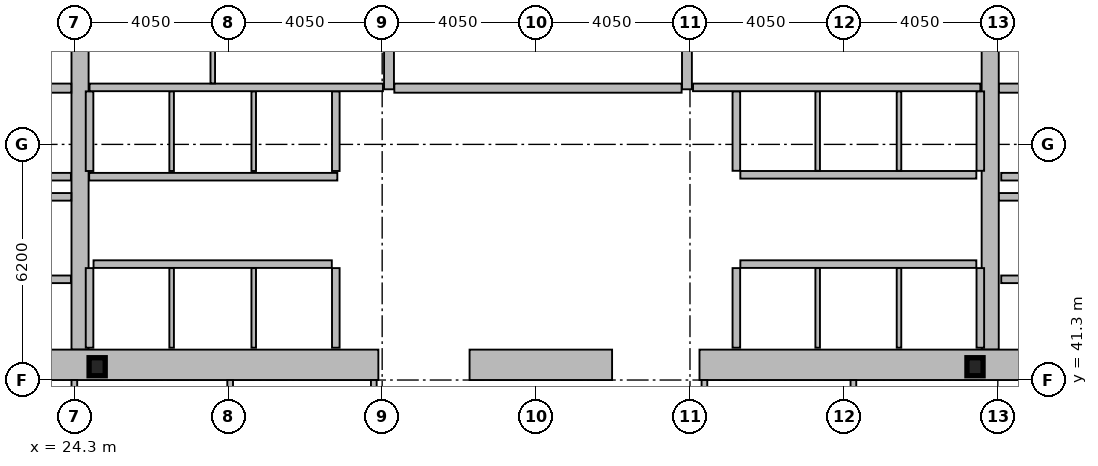
"""IFC4 building model, lengths in metres.
Left out: names, types, materials, properties, quantities, classifications, styles, units other than length and angle.
Written with IfcOpenShell. Run it as: python <this file> out.ifc"""

import sys

from ifc_helpers import new_model, si_unit, direction, frame, frame_2d, origin, origin_2d, place, context, subcontext, project, spatial, rectangle, i_section, extrude, element, fill, save


model = new_model("IFC4")
c1 = context("Model", 3, precision=1e-05, world=origin(), true_north=direction((0.0, 1.0)))
c2 = subcontext(c1, "Body", "Model", "MODEL_VIEW")
j1 = project(units=[si_unit("LENGTHUNIT", "METRE"), si_unit("PLANEANGLEUNIT", "RADIAN")], contexts=[c1])
p1 = place(None, origin())
s1 = spatial("IfcSite", under=j1, at=p1, CompositionType="ELEMENT")
p2 = place(p1, origin())
s2 = spatial("IfcBuilding", under=s1, at=p2, CompositionType="ELEMENT")
p3 = place(p2, frame((0.0, 0.0, 25.8)))
s3 = spatial("IfcBuildingStorey", under=s2, at=p3, CompositionType="ELEMENT", Elevation=25.8)
for number, where, z_axis, x_axis in (
    (1, (24.45, 42.1, 0.0), (0.0, 0.0, 1.0), (0.0, 1.0, 0.0)),
    (2, (48.4, 42.1, 0.0), (0.0, 0.0, 1.0), (0.0, 1.0, 0.0)),
):
    element("IfcWall", number, at=place(p3, frame(where, z_axis=z_axis, x_axis=x_axis)), inside=s3, PredefinedType="SHEAR", context=c2, shape_type="SweptSolid", body=[
        extrude(rectangle(XDim=10.8, YDim=0.45, at=frame_2d((5.4, 0.0))), origin(), (0.0, 0.0, 1.0), 3.82),
    ])
p4 = place(p3, frame((32.3, 41.7, 0.0), z_axis=(0.0, 0.0, 1.0), x_axis=(-1.0, 0.0, 0.0)))
e3 = element("IfcWall", 3, at=p4, inside=s3, PredefinedType="SHEAR", context=c2, shape_type="SweptSolid", body=[
    extrude(rectangle(XDim=11.45, YDim=0.8, at=frame_2d((5.725, 0.0))), origin(), (0.0, 0.0, 1.0), 3.82),
])
p5 = place(p3, frame((38.45, 41.7, 0.0), z_axis=(0.0, 0.0, 1.0), x_axis=(-1.0, 0.0, 0.0)))
e4 = element("IfcWall", 4, at=p5, inside=s3, PredefinedType="SHEAR", context=c2, shape_type="SweptSolid", body=[
    extrude(rectangle(XDim=3.75, YDim=0.8, at=frame_2d((1.875, 0.0))), origin(), (0.0, 0.0, 1.0), 3.82),
])
p6 = place(p3, frame((52.05, 41.7, 0.0), z_axis=(0.0, 0.0, 1.0), x_axis=(-1.0, 0.0, 0.0)))
e5 = element("IfcWall", 5, at=p6, inside=s3, PredefinedType="SHEAR", context=c2, shape_type="SweptSolid", body=[
    extrude(rectangle(XDim=11.3, YDim=0.8, at=frame_2d((5.65, 0.0))), origin(), (0.0, 0.0, 1.0), 3.82),
])
for number, where, z_axis, x_axis in (
    (6, (32.58, 48.95, 0.0), (0.0, 0.0, 1.0), (0.0, 1.0, 0.0)),
    (7, (40.42, 48.95, 0.0), (0.0, 0.0, 1.0), (0.0, 1.0, 0.0)),
):
    element("IfcWall", number, at=place(p3, frame(where, z_axis=z_axis, x_axis=x_axis)), inside=s3, PredefinedType="SHEAR", context=c2, shape_type="SweptSolid", body=[
        extrude(rectangle(XDim=3.95, YDim=0.26, at=frame_2d((1.975, 0.0))), origin(), (0.0, 0.0, 1.0), 3.82),
    ])
p7 = place(p3, frame((17.0, 48.98, 0.0), z_axis=(0.0, 0.0, 1.0), x_axis=(1.0, 0.0, 0.0)))
e8 = element("IfcWall", 8, at=p7, inside=s3, PredefinedType="SHEAR", context=c2, shape_type="SweptSolid", body=[
    extrude(rectangle(XDim=7.22, YDim=0.24, at=frame_2d((3.61, 0.0))), origin(), (0.0, 0.0, 1.0), 3.82),
])
p8 = place(p7, frame((0.22, 0.0, 0.0)))
e9 = element("IfcOpeningElement", 9, at=p8, cuts=e8, PredefinedType="OPENING", context=c2, shape_type="SweptSolid", body=[
    extrude(rectangle(XDim=1.05, YDim=2.15, at=frame_2d((0.525, 1.075))), frame((0.0, 0.13, 0.0), z_axis=(0.0, -1.0, 0.0), x_axis=(1.0, 0.0, 0.0)), (0.0, 0.0, 1.0), 0.26),
])
p9 = place(p3, frame((48.63, 48.98, 0.0), z_axis=(0.0, 0.0, 1.0), x_axis=(1.0, 0.0, 0.0)))
e10 = element("IfcWall", 10, at=p9, inside=s3, PredefinedType="SHEAR", context=c2, shape_type="SweptSolid", body=[
    extrude(rectangle(XDim=7.27, YDim=0.24, at=frame_2d((3.635, 0.0))), origin(), (0.0, 0.0, 1.0), 3.82),
])
p10 = place(p9, frame((6.0, 0.0, 0.0)))
e11 = element("IfcOpeningElement", 11, at=p10, cuts=e10, PredefinedType="OPENING", context=c2, shape_type="SweptSolid", body=[
    extrude(rectangle(XDim=1.05, YDim=2.15, at=frame_2d((0.525, 1.075))), frame((0.0, 0.13, 0.0), z_axis=(0.0, -1.0, 0.0), x_axis=(1.0, 0.0, 0.0)), (0.0, 0.0, 1.0), 0.26),
])
p11 = place(p3, frame((32.72, 48.98, 0.0), z_axis=(0.0, 0.0, 1.0), x_axis=(1.0, 0.0, 0.0)))
e12 = element("IfcWall", 12, at=p11, inside=s3, PredefinedType="SHEAR", context=c2, shape_type="SweptSolid", body=[
    extrude(rectangle(XDim=7.56, YDim=0.24, at=frame_2d((3.78, 0.0))), origin(), (0.0, 0.0, 1.0), 3.82),
])
p12 = place(p11, frame((0.22, 0.0, 0.0)))
e13 = element("IfcOpeningElement", 13, at=p12, cuts=e12, PredefinedType="OPENING", context=c2, shape_type="SweptSolid", body=[
    extrude(rectangle(XDim=1.05, YDim=2.15, at=frame_2d((0.525, 1.075))), frame((0.0, 0.13, 0.0), z_axis=(0.0, -1.0, 0.0), x_axis=(1.0, 0.0, 0.0)), (0.0, 0.0, 1.0), 0.26),
])
for number, where, z_axis, x_axis in (
    (14, (24.9, 41.65, 0.0), (0.0, 0.0, 1.0), (1.0, 0.0, 0.0)),
    (15, (48.0, 41.65, 0.0), (0.0, 0.0, 1.0), (1.0, 0.0, 0.0)),
):
    element("IfcColumn", number, at=place(p3, frame(where, z_axis=z_axis, x_axis=x_axis)), inside=s3, PredefinedType="COLUMN", context=c2, shape_type="SweptSolid", body=[
        extrude(i_section(OverallWidth=0.424, OverallDepth=0.474, WebThickness=0.048, FlangeThickness=0.077, at=origin_2d()), origin(), (0.0, 0.0, 1.0), 4.0),
    ])
p13 = place(p3, frame((51.61, 43.95, 0.0), z_axis=(0.0, 0.0, 1.0), x_axis=(-1.0, 0.0, 0.0)))
e16 = element("IfcWall", 16, at=p13, inside=s3, PredefinedType="PARTITIONING", context=c2, shape_type="SweptSolid", body=[
    extrude(rectangle(XDim=2.92, YDim=0.2, at=frame_2d((1.46, 0.0))), origin(), (0.0, 0.0, 1.0), 3.82),
])
p14 = place(p13, frame((0.81, 0.0, 0.0)))
e17 = element("IfcOpeningElement", 17, at=p14, cuts=e16, PredefinedType="OPENING", context=c2, shape_type="SweptSolid", body=[
    extrude(rectangle(XDim=1.3, YDim=2.18, at=frame_2d((0.65, 1.09))), frame((0.0, 0.11, 0.0), z_axis=(0.0, -1.0, 0.0), x_axis=(1.0, 0.0, 0.0)), (0.0, 0.0, 1.0), 0.22),
])
p15 = place(p3, frame((24.21, 43.95, 0.0), z_axis=(0.0, 0.0, 1.0), x_axis=(-1.0, 0.0, 0.0)))
e18 = element("IfcWall", 18, at=p15, inside=s3, PredefinedType="PARTITIONING", context=c2, shape_type="SweptSolid", body=[
    extrude(rectangle(XDim=2.97, YDim=0.2, at=frame_2d((1.485, 0.0))), origin(), (0.0, 0.0, 1.0), 3.82),
])
p16 = place(p15, frame((0.86, 0.0, 0.0)))
e19 = element("IfcOpeningElement", 19, at=p16, cuts=e18, PredefinedType="OPENING", context=c2, shape_type="SweptSolid", body=[
    extrude(rectangle(XDim=1.3, YDim=2.18, at=frame_2d((0.65, 1.09))), frame((0.0, 0.11, 0.0), z_axis=(0.0, -1.0, 0.0), x_axis=(1.0, 0.0, 0.0)), (0.0, 0.0, 1.0), 0.22),
])
p17 = place(p3, frame((51.61, 46.65, 0.0), z_axis=(0.0, 0.0, 1.0), x_axis=(-1.0, 0.0, 0.0)))
e20 = element("IfcWall", 20, at=p17, inside=s3, PredefinedType="PARTITIONING", context=c2, shape_type="SweptSolid", body=[
    extrude(rectangle(XDim=2.92, YDim=0.2, at=frame_2d((1.46, 0.0))), origin(), (0.0, 0.0, 1.0), 3.82),
])
p18 = place(p17, frame((0.86, 0.0, 0.0)))
e21 = element("IfcOpeningElement", 21, at=p18, cuts=e20, PredefinedType="OPENING", context=c2, shape_type="SweptSolid", body=[
    extrude(rectangle(XDim=1.2, YDim=2.18, at=frame_2d((0.6, 1.09))), frame((0.0, 0.11, 0.0), z_axis=(0.0, -1.0, 0.0), x_axis=(1.0, 0.0, 0.0)), (0.0, 0.0, 1.0), 0.22),
])
p19 = place(p3, frame((24.21, 46.65, 0.0), z_axis=(0.0, 0.0, 1.0), x_axis=(-1.0, 0.0, 0.0)))
e22 = element("IfcWall", 22, at=p19, inside=s3, PredefinedType="PARTITIONING", context=c2, shape_type="SweptSolid", body=[
    extrude(rectangle(XDim=2.97, YDim=0.2, at=frame_2d((1.485, 0.0))), origin(), (0.0, 0.0, 1.0), 3.82),
])
p20 = place(p19, frame((0.91, 0.0, 0.0)))
e23 = element("IfcOpeningElement", 23, at=p20, cuts=e22, PredefinedType="OPENING", context=c2, shape_type="SweptSolid", body=[
    extrude(rectangle(XDim=1.2, YDim=2.18, at=frame_2d((0.6, 1.09))), frame((0.0, 0.11, 0.0), z_axis=(0.0, -1.0, 0.0), x_axis=(1.0, 0.0, 0.0)), (0.0, 0.0, 1.0), 0.22),
])
p21 = place(p3, frame((31.22, 46.65, 0.0), z_axis=(0.0, 0.0, 1.0), x_axis=(-1.0, 0.0, 0.0)))
e24 = element("IfcWall", 24, at=p21, inside=s3, PredefinedType="PARTITIONING", context=c2, shape_type="SweptSolid", body=[
    extrude(rectangle(XDim=6.53, YDim=0.2, at=frame_2d((3.265, 0.0))), origin(), (0.0, 0.0, 1.0), 3.82),
])
p22 = place(p21, frame((4.9, 0.0, 0.0)))
e25 = element("IfcOpeningElement", 25, at=p22, cuts=e24, PredefinedType="OPENING", context=c2, shape_type="SweptSolid", body=[
    extrude(rectangle(XDim=1.1, YDim=2.18, at=frame_2d((0.55, 1.09))), frame((0.0, 0.11, 0.0), z_axis=(0.0, -1.0, 0.0), x_axis=(1.0, 0.0, 0.0)), (0.0, 0.0, 1.0), 0.22),
])
p23 = place(p21, frame((2.74, 0.0, 0.0)))
e26 = element("IfcOpeningElement", 26, at=p23, cuts=e24, PredefinedType="OPENING", context=c2, shape_type="SweptSolid", body=[
    extrude(rectangle(XDim=1.1, YDim=2.18, at=frame_2d((0.55, 1.09))), frame((0.0, 0.11, 0.0), z_axis=(0.0, -1.0, 0.0), x_axis=(1.0, 0.0, 0.0)), (0.0, 0.0, 1.0), 0.22),
])
p24 = place(p21, frame((0.58, 0.0, 0.0)))
e27 = element("IfcOpeningElement", 27, at=p24, cuts=e24, PredefinedType="OPENING", context=c2, shape_type="SweptSolid", body=[
    extrude(rectangle(XDim=1.1, YDim=2.18, at=frame_2d((0.55, 1.09))), frame((0.0, 0.11, 0.0), z_axis=(0.0, -1.0, 0.0), x_axis=(1.0, 0.0, 0.0)), (0.0, 0.0, 1.0), 0.22),
])
p25 = place(p3, frame((21.2, 46.12, 0.0), z_axis=(0.0, 0.0, 1.0), x_axis=(1.0, 0.0, 0.0)))
e28 = element("IfcWall", 28, at=p25, inside=s3, PredefinedType="PARTITIONING", context=c2, shape_type="SweptSolid", body=[
    extrude(rectangle(XDim=3.02, YDim=0.2, at=frame_2d((1.51, 0.0))), origin(), (0.0, 0.0, 1.0), 3.82),
])
p26 = place(p3, frame((48.63, 46.12, 0.0), z_axis=(0.0, 0.0, 1.0), x_axis=(1.0, 0.0, 0.0)))
e29 = element("IfcWall", 29, at=p26, inside=s3, PredefinedType="PARTITIONING", context=c2, shape_type="SweptSolid", body=[
    extrude(rectangle(XDim=3.07, YDim=0.2, at=frame_2d((1.535, 0.0))), origin(), (0.0, 0.0, 1.0), 3.82),
])
for number, where, z_axis, x_axis in (
    (30, (24.7, 46.8, 0.0), (0.0, 0.0, 1.0), (0.0, 1.0, 0.0)),
    (31, (31.18, 46.8, 0.0), (0.0, 0.0, 1.0), (0.0, 1.0, 0.0)),
):
    element("IfcWall", number, at=place(p3, frame(where, z_axis=z_axis, x_axis=x_axis)), inside=s3, PredefinedType="PARTITIONING", context=c2, shape_type="SweptSolid", body=[
        extrude(rectangle(XDim=2.095, YDim=0.2, at=frame_2d((1.047, 0.0))), origin(), (0.0, 0.0, 1.0), 3.82),
    ])
for number, where, z_axis, x_axis in (
    (32, (26.86, 46.8, 0.0), (0.0, 0.0, 1.0), (0.0, 1.0, 0.0)),
    (33, (29.02, 46.8, 0.0), (0.0, 0.0, 1.0), (0.0, 1.0, 0.0)),
):
    element("IfcWall", number, at=place(p3, frame(where, z_axis=z_axis, x_axis=x_axis)), inside=s3, PredefinedType="PARTITIONING", context=c2, shape_type="SweptSolid", body=[
        extrude(rectangle(XDim=2.095, YDim=0.12, at=frame_2d((1.047, 0.0))), origin(), (0.0, 0.0, 1.0), 3.82),
    ])
p27 = place(p3, frame((24.805, 44.35, 0.0), z_axis=(0.0, 0.0, 1.0), x_axis=(1.0, 0.0, 0.0)))
e34 = element("IfcWall", 34, at=p27, inside=s3, PredefinedType="PARTITIONING", context=c2, shape_type="SweptSolid", body=[
    extrude(rectangle(XDim=6.27, YDim=0.2, at=frame_2d((3.135, 0.0))), origin(), (0.0, 0.0, 1.0), 3.82),
])
for number, where, z_axis, x_axis in (
    (35, (24.7, 42.15, 0.0), (0.0, 0.0, 1.0), (0.0, 1.0, 0.0)),
    (36, (31.18, 42.15, 0.0), (0.0, 0.0, 1.0), (0.0, 1.0, 0.0)),
):
    element("IfcWall", number, at=place(p3, frame(where, z_axis=z_axis, x_axis=x_axis)), inside=s3, PredefinedType="PARTITIONING", context=c2, shape_type="SweptSolid", body=[
        extrude(rectangle(XDim=2.095, YDim=0.2, at=frame_2d((1.048, 0.0))), origin(), (0.0, 0.0, 1.0), 3.82),
    ])
for number, where, z_axis, x_axis in (
    (37, (26.86, 42.15, 0.0), (0.0, 0.0, 1.0), (0.0, 1.0, 0.0)),
    (38, (29.02, 42.15, 0.0), (0.0, 0.0, 1.0), (0.0, 1.0, 0.0)),
):
    element("IfcWall", number, at=place(p3, frame(where, z_axis=z_axis, x_axis=x_axis)), inside=s3, PredefinedType="PARTITIONING", context=c2, shape_type="SweptSolid", body=[
        extrude(rectangle(XDim=2.095, YDim=0.12, at=frame_2d((1.048, 0.0))), origin(), (0.0, 0.0, 1.0), 3.82),
    ])
p28 = place(p3, frame((41.825, 46.7, 0.0), z_axis=(0.0, 0.0, 1.0), x_axis=(1.0, 0.0, 0.0)))
e39 = element("IfcWall", 39, at=p28, inside=s3, PredefinedType="PARTITIONING", context=c2, shape_type="SweptSolid", body=[
    extrude(rectangle(XDim=6.21, YDim=0.2, at=frame_2d((3.105, 0.0))), origin(), (0.0, 0.0, 1.0), 3.82),
])
for number, where, z_axis, x_axis in (
    (40, (41.72, 46.805, 0.0), (0.0, 0.0, 1.0), (0.0, 1.0, 0.0)),
    (41, (48.14, 46.805, 0.0), (0.0, 0.0, 1.0), (0.0, 1.0, 0.0)),
):
    element("IfcWall", number, at=place(p3, frame(where, z_axis=z_axis, x_axis=x_axis)), inside=s3, PredefinedType="PARTITIONING", context=c2, shape_type="SweptSolid", body=[
        extrude(rectangle(XDim=2.09, YDim=0.2, at=frame_2d((1.045, 0.0))), origin(), (0.0, 0.0, 1.0), 3.82),
    ])
for number, where, z_axis, x_axis in (
    (42, (43.86, 46.805, 0.0), (0.0, 0.0, 1.0), (0.0, 1.0, 0.0)),
    (43, (46.0, 46.805, 0.0), (0.0, 0.0, 1.0), (0.0, 1.0, 0.0)),
):
    element("IfcWall", number, at=place(p3, frame(where, z_axis=z_axis, x_axis=x_axis)), inside=s3, PredefinedType="PARTITIONING", context=c2, shape_type="SweptSolid", body=[
        extrude(rectangle(XDim=2.09, YDim=0.12, at=frame_2d((1.045, 0.0))), origin(), (0.0, 0.0, 1.0), 3.82),
    ])
p29 = place(p3, frame((41.825, 44.35, 0.0), z_axis=(0.0, 0.0, 1.0), x_axis=(1.0, 0.0, 0.0)))
e44 = element("IfcWall", 44, at=p29, inside=s3, PredefinedType="PARTITIONING", context=c2, shape_type="SweptSolid", body=[
    extrude(rectangle(XDim=6.21, YDim=0.2, at=frame_2d((3.105, 0.0))), origin(), (0.0, 0.0, 1.0), 3.82),
])
for number, where, z_axis, x_axis in (
    (45, (41.72, 42.15, 0.0), (0.0, 0.0, 1.0), (0.0, 1.0, 0.0)),
    (46, (48.14, 42.15, 0.0), (0.0, 0.0, 1.0), (0.0, 1.0, 0.0)),
):
    element("IfcWall", number, at=place(p3, frame(where, z_axis=z_axis, x_axis=x_axis)), inside=s3, PredefinedType="PARTITIONING", context=c2, shape_type="SweptSolid", body=[
        extrude(rectangle(XDim=2.095, YDim=0.2, at=frame_2d((1.048, 0.0))), origin(), (0.0, 0.0, 1.0), 3.82),
    ])
for number, where, z_axis, x_axis in (
    (47, (43.86, 42.15, 0.0), (0.0, 0.0, 1.0), (0.0, 1.0, 0.0)),
    (48, (46.0, 42.15, 0.0), (0.0, 0.0, 1.0), (0.0, 1.0, 0.0)),
):
    element("IfcWall", number, at=place(p3, frame(where, z_axis=z_axis, x_axis=x_axis)), inside=s3, PredefinedType="PARTITIONING", context=c2, shape_type="SweptSolid", body=[
        extrude(rectangle(XDim=2.095, YDim=0.12, at=frame_2d((1.048, 0.0))), origin(), (0.0, 0.0, 1.0), 3.82),
    ])
p30 = place(p3, frame((24.7, 49.0, 0.0), z_axis=(0.0, 0.0, 1.0), x_axis=(1.0, 0.0, 0.0)))
e49 = element("IfcWall", 49, at=p30, inside=s3, PredefinedType="PARTITIONING", context=c2, shape_type="SweptSolid", body=[
    extrude(rectangle(XDim=7.72, YDim=0.2, at=frame_2d((3.86, 0.0))), origin(), (0.0, 0.0, 1.0), 3.82),
])
p31 = place(p30, frame((6.56, 0.0, 0.0)))
e50 = element("IfcOpeningElement", 50, at=p31, cuts=e49, PredefinedType="OPENING", context=c2, shape_type="SweptSolid", body=[
    extrude(rectangle(XDim=0.95, YDim=2.1, at=frame_2d((0.475, 1.05))), frame((0.0, 0.11, 0.0), z_axis=(0.0, -1.0, 0.0), x_axis=(1.0, 0.0, 0.0)), (0.0, 0.0, 1.0), 0.22),
])
p32 = place(p3, frame((27.942, 49.105, 0.0), z_axis=(0.0, 0.0, 1.0), x_axis=(0.0, 1.0, 0.0)))
e51 = element("IfcWall", 51, at=p32, inside=s3, PredefinedType="PARTITIONING", context=c2, shape_type="SweptSolid", body=[
    extrude(rectangle(XDim=3.69, YDim=0.12, at=frame_2d((1.845, 0.0))), origin(), (0.0, 0.0, 1.0), 3.82),
])
p33 = place(p32, frame((1.05, 0.0, 0.0)))
e52 = element("IfcOpeningElement", 52, at=p33, cuts=e51, PredefinedType="OPENING", context=c2, shape_type="SweptSolid", body=[
    extrude(rectangle(XDim=0.9, YDim=2.05, at=frame_2d((0.45, 1.025))), frame((0.0, 0.07, 0.0), z_axis=(0.0, -1.0, 0.0), x_axis=(1.0, 0.0, 0.0)), (0.0, 0.0, 1.0), 0.14),
])
p34 = place(p3, frame((40.58, 49.0, 0.0), z_axis=(0.0, 0.0, 1.0), x_axis=(1.0, 0.0, 0.0)))
e53 = element("IfcWall", 53, at=p34, inside=s3, PredefinedType="PARTITIONING", context=c2, shape_type="SweptSolid", body=[
    extrude(rectangle(XDim=7.56, YDim=0.2, at=frame_2d((3.78, 0.0))), origin(), (0.0, 0.0, 1.0), 3.82),
])
p35 = place(p34, frame((0.16, 0.0, 0.0)))
e54 = element("IfcOpeningElement", 54, at=p35, cuts=e53, PredefinedType="OPENING", context=c2, shape_type="SweptSolid", body=[
    extrude(rectangle(XDim=0.95, YDim=2.1, at=frame_2d((0.475, 1.05))), frame((0.0, 0.11, 0.0), z_axis=(0.0, -1.0, 0.0), x_axis=(1.0, 0.0, 0.0)), (0.0, 0.0, 1.0), 0.22),
])
for number, where, z_axis, x_axis in (
    (55, (24.3, 38.28, 0.0), (0.0, 0.0, 1.0), (0.0, 1.0, 0.0)),
    (56, (28.4, 38.28, 0.0), (0.0, 0.0, 1.0), (0.0, 1.0, 0.0)),
    (57, (32.18, 38.28, 0.0), (0.0, 0.0, 1.0), (0.0, 1.0, 0.0)),
    (58, (40.88, 38.28, 0.0), (0.0, 0.0, 1.0), (0.0, 1.0, 0.0)),
    (59, (44.8, 38.28, 0.0), (0.0, 0.0, 1.0), (0.0, 1.0, 0.0)),
):
    element("IfcWall", number, at=place(p3, frame(where, z_axis=z_axis, x_axis=x_axis)), inside=s3, PredefinedType="PARTITIONING", context=c2, shape_type="SweptSolid", body=[
        extrude(rectangle(XDim=3.02, YDim=0.15, at=frame_2d((1.51, 0.0))), origin(), (0.0, 0.0, 1.0), 3.82),
    ])
p36 = place(p12, origin())
e60 = element("IfcDoor", 60, at=p36, inside=s3, OperationType="SINGLE_SWING_LEFT", PredefinedType="DOOR", context=c2, shape_type="SweptSolid", body=[
    extrude(rectangle(XDim=1.05, YDim=2.15, at=frame_2d((0.525, 1.075))), frame((0.0, 0.025, 0.0), z_axis=(0.0, -1.0, 0.0), x_axis=(1.0, 0.0, 0.0)), (0.0, 0.0, 1.0), 0.05),
])
fill(e13, e60)
p37 = place(p22, origin())
e61 = element("IfcDoor", 61, at=p37, inside=s3, OperationType="SLIDING_TO_LEFT", PredefinedType="DOOR", context=c2, shape_type="SweptSolid", body=[
    extrude(rectangle(XDim=1.1, YDim=2.18, at=frame_2d((0.55, 1.09))), frame((0.0, 0.025, 0.0), z_axis=(0.0, -1.0, 0.0), x_axis=(1.0, 0.0, 0.0)), (0.0, 0.0, 1.0), 0.05),
])
fill(e25, e61)
p38 = place(p23, origin())
e62 = element("IfcDoor", 62, at=p38, inside=s3, OperationType="SLIDING_TO_LEFT", PredefinedType="DOOR", context=c2, shape_type="SweptSolid", body=[
    extrude(rectangle(XDim=1.1, YDim=2.18, at=frame_2d((0.55, 1.09))), frame((0.0, 0.025, 0.0), z_axis=(0.0, -1.0, 0.0), x_axis=(1.0, 0.0, 0.0)), (0.0, 0.0, 1.0), 0.05),
])
fill(e26, e62)
p39 = place(p24, origin())
e63 = element("IfcDoor", 63, at=p39, inside=s3, OperationType="SLIDING_TO_LEFT", PredefinedType="DOOR", context=c2, shape_type="SweptSolid", body=[
    extrude(rectangle(XDim=1.1, YDim=2.18, at=frame_2d((0.55, 1.09))), frame((0.0, 0.025, 0.0), z_axis=(0.0, -1.0, 0.0), x_axis=(1.0, 0.0, 0.0)), (0.0, 0.0, 1.0), 0.05),
])
fill(e27, e63)
p40 = place(p31, origin())
e64 = element("IfcDoor", 64, at=p40, inside=s3, OperationType="SINGLE_SWING_RIGHT", PredefinedType="DOOR", context=c2, shape_type="SweptSolid", body=[
    extrude(rectangle(XDim=0.95, YDim=2.1, at=frame_2d((0.475, 1.05))), frame((0.0, 0.025, 0.0), z_axis=(0.0, -1.0, 0.0), x_axis=(1.0, 0.0, 0.0)), (0.0, 0.0, 1.0), 0.05),
])
fill(e50, e64)
p41 = place(p35, origin())
e65 = element("IfcDoor", 65, at=p41, inside=s3, OperationType="SINGLE_SWING_RIGHT", PredefinedType="DOOR", context=c2, shape_type="SweptSolid", body=[
    extrude(rectangle(XDim=0.95, YDim=2.1, at=frame_2d((0.475, 1.05))), frame((0.0, 0.025, 0.0), z_axis=(0.0, -1.0, 0.0), x_axis=(1.0, 0.0, 0.0)), (0.0, 0.0, 1.0), 0.05),
])
fill(e54, e65)
save(model, sys.argv[1])
